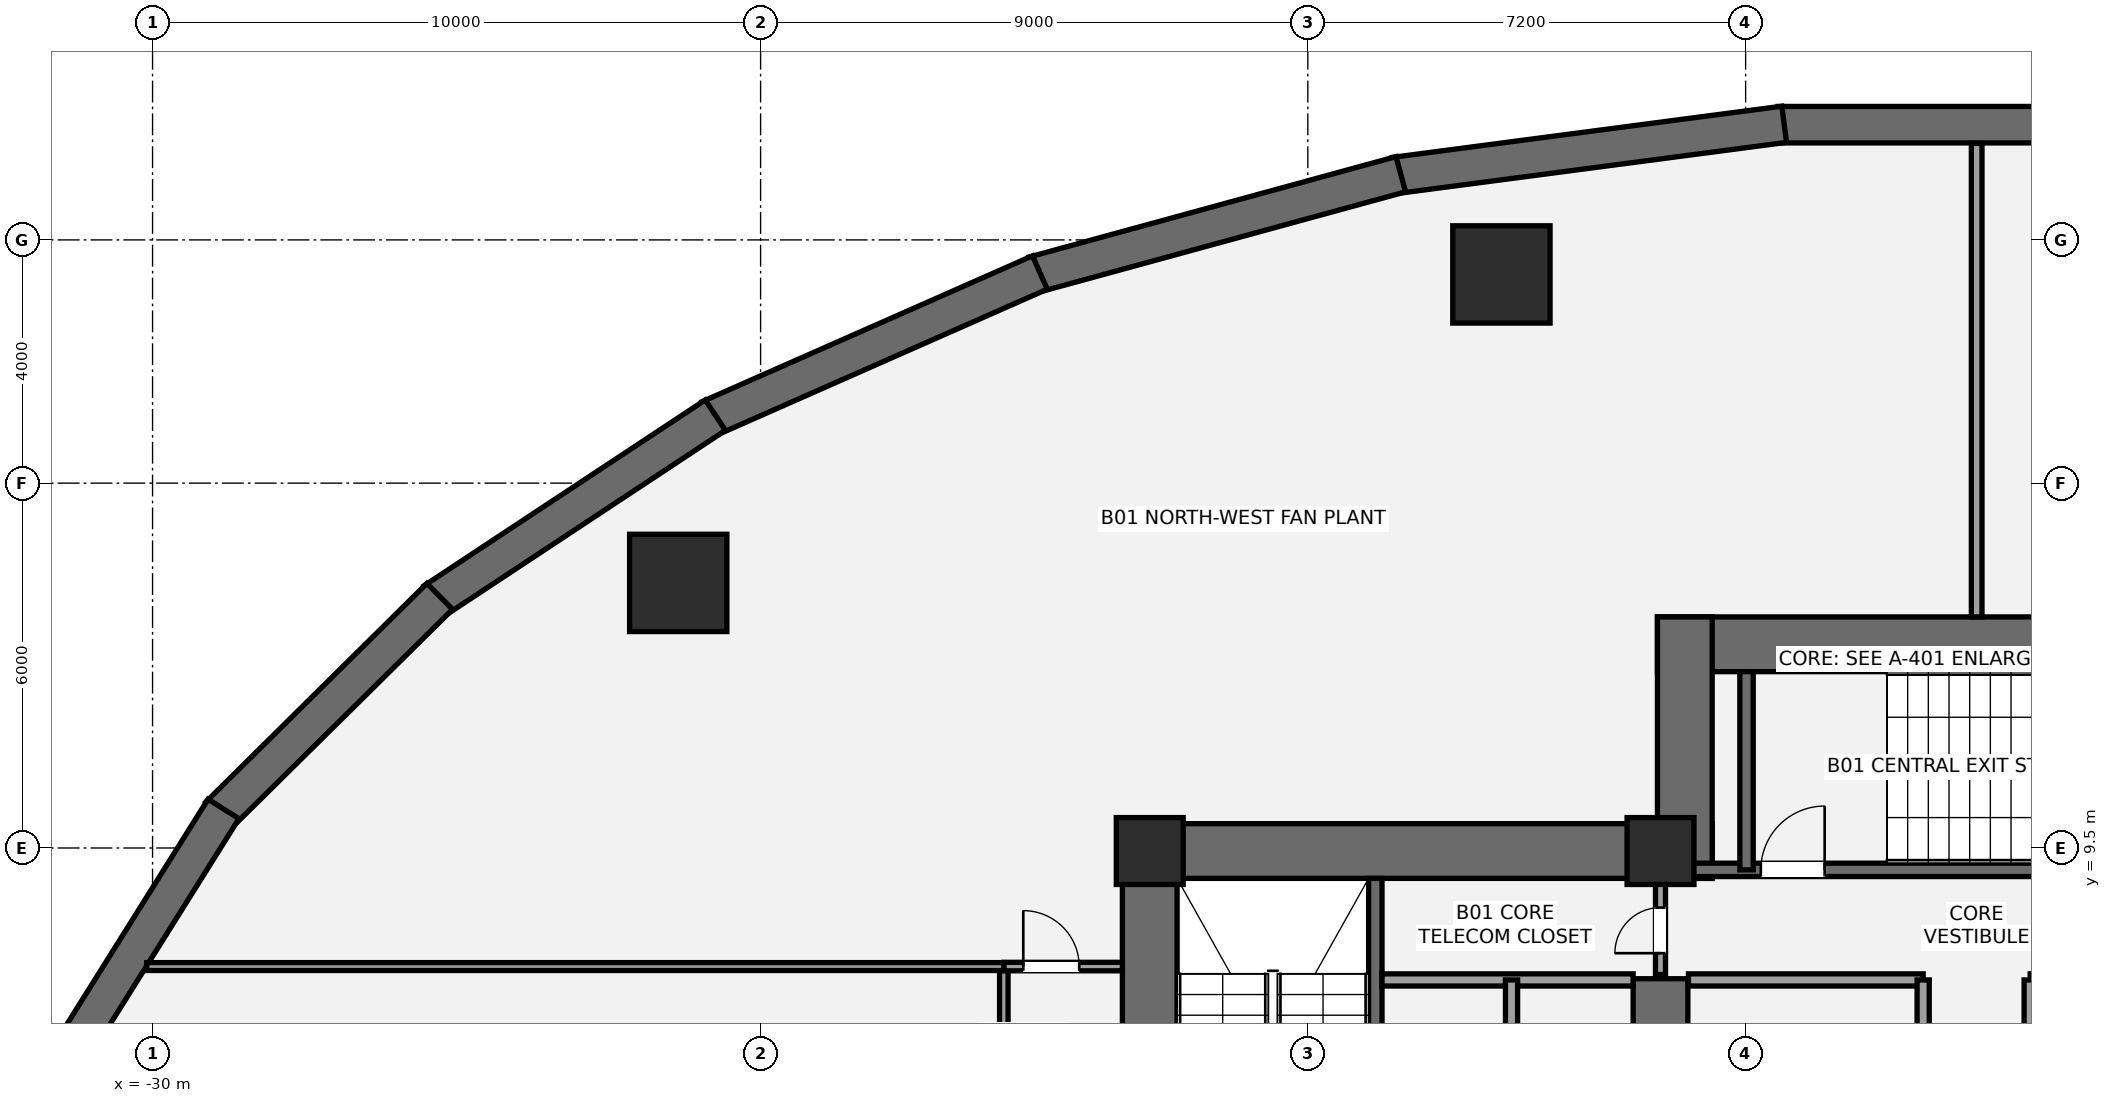
"""IFC4 building model, lengths in metres.
Left out: names, types, materials, properties, quantities, classifications, styles, units other than length and angle.
Written with IfcOpenShell. Run it as: python <this file> out.ifc"""

import sys

from ifc_helpers import new_model, si_unit, direction, frame, frame_2d, origin, origin_2d, place, context, subcontext, project, spatial, rectangle, hollow_circle, extrude, element, fill, save


model = new_model("IFC4")
c1 = context("Model", 3, precision=1e-05, world=origin(), true_north=direction((0.0, 1.0)))
c2 = subcontext(c1, "Body", "Model", "MODEL_VIEW")
j1 = project(units=[si_unit("LENGTHUNIT", "METRE"), si_unit("PLANEANGLEUNIT", "RADIAN")], contexts=[c1])
p1 = place(None, origin())
s1 = spatial("IfcSite", under=j1, at=p1, CompositionType="ELEMENT")
p2 = place(p1, origin())
s2 = spatial("IfcBuilding", under=s1, at=p2, CompositionType="ELEMENT")
p3 = place(p2, frame((0.0, 0.0, -4.4)))
s3 = spatial("IfcBuildingStorey", under=s2, at=p3, CompositionType="ELEMENT", Elevation=-4.4)
p4 = place(p3, frame((3.265, 21.395, 0.0), z_axis=(0.0, 0.0, 1.0), x_axis=(-1.0, 0.0, 0.0)))
e1 = element("IfcWall", 1, at=p4, inside=s3, PredefinedType="USERDEFINED", context=c2, shape_type="SweptSolid", body=[
    extrude(rectangle(XDim=6.529, YDim=0.6, at=frame_2d((3.265, 0.0))), origin(), (0.0, 0.0, 1.0), 4.4),
])
p5 = place(p3, frame((-3.166, 21.402, 0.0), z_axis=(0.0, 0.0, 1.0), x_axis=(-0.991471782517, -0.130321542624, 0.0)))
e2 = element("IfcWall", 2, at=p5, inside=s3, PredefinedType="USERDEFINED", context=c2, shape_type="SweptSolid", body=[
    extrude(rectangle(XDim=6.459, YDim=0.6, at=frame_2d((3.23, 0.0))), origin(), (0.0, 0.0, 1.0), 4.4),
])
p6 = place(p3, frame((-9.471, 20.58, 0.0), z_axis=(0.0, 0.0, 1.0), x_axis=(-0.964548276597, -0.263906464707, 0.0)))
e3 = element("IfcWall", 3, at=p6, inside=s3, PredefinedType="USERDEFINED", context=c2, shape_type="SweptSolid", body=[
    extrude(rectangle(XDim=6.257, YDim=0.6, at=frame_2d((3.128, 0.0))), origin(), (0.0, 0.0, 1.0), 4.4),
])
p7 = place(p3, frame((-15.407, 18.964, 0.0), z_axis=(0.0, 0.0, 1.0), x_axis=(-0.91483072277, -0.403837527574, 0.0)))
e4 = element("IfcWall", 4, at=p7, inside=s3, PredefinedType="USERDEFINED", context=c2, shape_type="SweptSolid", body=[
    extrude(rectangle(XDim=5.94, YDim=0.6, at=frame_2d((2.97, 0.0))), origin(), (0.0, 0.0, 1.0), 4.4),
])
p8 = place(p3, frame((-20.745, 16.618, 0.0), z_axis=(0.0, 0.0, 1.0), x_axis=(-0.834367518908, -0.551208529861, 0.0)))
e5 = element("IfcWall", 5, at=p8, inside=s3, PredefinedType="USERDEFINED", context=c2, shape_type="SweptSolid", body=[
    extrude(rectangle(XDim=5.542, YDim=0.6, at=frame_2d((2.771, 0.0))), origin(), (0.0, 0.0, 1.0), 4.4),
])
p9 = place(p3, frame((-25.277, 13.638, 0.0), z_axis=(0.0, 0.0, 1.0), x_axis=(-0.711105403666, -0.70308541791, 0.0)))
e6 = element("IfcWall", 6, at=p9, inside=s3, PredefinedType="USERDEFINED", context=c2, shape_type="SweptSolid", body=[
    extrude(rectangle(XDim=5.114, YDim=0.6, at=frame_2d((2.557, 0.0))), origin(), (0.0, 0.0, 1.0), 4.4),
])
p10 = place(p3, frame((-28.833, 10.142, 0.0), z_axis=(0.0, 0.0, 1.0), x_axis=(-0.531244363113, -0.847218641592, 0.0)))
e7 = element("IfcWall", 7, at=p10, inside=s3, PredefinedType="USERDEFINED", context=c2, shape_type="SweptSolid", body=[
    extrude(rectangle(XDim=4.72, YDim=0.6, at=frame_2d((2.36, 0.0))), origin(), (0.0, 0.0, 1.0), 4.4),
])
p11 = place(p3, frame((-13.6, 0.95, 0.0), z_axis=(0.0, 0.0, 1.0), x_axis=(0.0, 1.0, 0.0)))
e8 = element("IfcWall", 8, at=p11, inside=s3, PredefinedType="SHEAR", context=c2, shape_type="SweptSolid", body=[
    extrude(rectangle(XDim=8.95, YDim=0.9, at=frame_2d((4.475, 0.0))), origin(), (0.0, 0.0, 1.0), 4.4),
])
p12 = place(p3, frame((-14.05, 9.45, 0.0), z_axis=(0.0, 0.0, 1.0), x_axis=(1.0, 0.0, 0.0)))
e9 = element("IfcWall", 9, at=p12, inside=s3, PredefinedType="SHEAR", context=c2, shape_type="SweptSolid", body=[
    extrude(rectangle(XDim=9.7, YDim=0.9, at=frame_2d((4.85, 0.0))), origin(), (0.0, 0.0, 1.0), 4.4),
])
p13 = place(p3, frame((-5.2, 5.35, 0.0), z_axis=(0.0, 0.0, 1.0), x_axis=(0.0, 1.0, 0.0)))
e10 = element("IfcWall", 10, at=p13, inside=s3, PredefinedType="SHEAR", context=c2, shape_type="SweptSolid", body=[
    extrude(rectangle(XDim=2.0, YDim=0.9, at=frame_2d((1.0, 0.0))), origin(), (0.0, 0.0, 1.0), 4.4),
])
p14 = place(p3, frame((-9.89, 1.85, 0.0), z_axis=(0.0, 0.0, 1.0), x_axis=(0.0, 1.0, 0.0)))
e11 = element("IfcWall", 11, at=p14, inside=s3, PredefinedType="SHEAR", context=c2, shape_type="SweptSolid", body=[
    extrude(rectangle(XDim=7.15, YDim=0.22, at=frame_2d((3.575, 0.0))), origin(), (0.0, 0.0, 1.0), 4.4),
])
p15 = place(p3, frame((-5.25, 12.85, 0.0), z_axis=(0.0, 0.0, 1.0), x_axis=(1.0, 0.0, 0.0)))
e12 = element("IfcWall", 12, at=p15, inside=s3, PredefinedType="SHEAR", context=c2, shape_type="SweptSolid", body=[
    extrude(rectangle(XDim=10.5, YDim=0.9, at=frame_2d((5.25, 0.0))), origin(), (0.0, 0.0, 1.0), 4.4),
])
p16 = place(p3, frame((-4.8, 9.0, 0.0), z_axis=(0.0, 0.0, 1.0), x_axis=(0.0, 1.0, 0.0)))
e13 = element("IfcWall", 13, at=p16, inside=s3, PredefinedType="SHEAR", context=c2, shape_type="SweptSolid", body=[
    extrude(rectangle(XDim=4.3, YDim=0.9, at=frame_2d((2.15, 0.0))), origin(), (0.0, 0.0, 1.0), 4.4),
])
p17 = place(p3, frame((-4.7, 9.14, 0.0), z_axis=(0.0, 0.0, 1.0), x_axis=(1.0, 0.0, 0.0)))
e14 = element("IfcWall", 14, at=p17, inside=s3, PredefinedType="SHEAR", context=c2, shape_type="SweptSolid", body=[
    extrude(rectangle(XDim=9.3, YDim=0.22, at=frame_2d((4.65, 0.0))), origin(), (0.0, 0.0, 1.0), 4.4),
])
p18 = place(p17, frame((1.15, 0.0, 0.0)))
e15 = element("IfcOpeningElement", 15, at=p18, cuts=e14, PredefinedType="OPENING", context=c2, shape_type="SweptSolid", body=[
    extrude(rectangle(XDim=1.05, YDim=2.15, at=frame_2d((0.525, 1.075))), frame((0.0, 0.12, 0.0), z_axis=(0.0, -1.0, 0.0), x_axis=(1.0, 0.0, 0.0)), (0.0, 0.0, 1.0), 0.24),
])
p19 = place(p3, frame((-3.785, 9.14, 0.0), z_axis=(0.0, 0.0, 1.0), x_axis=(0.0, 1.0, 0.0)))
e16 = element("IfcWall", 16, at=p19, inside=s3, PredefinedType="SHEAR", context=c2, shape_type="SweptSolid", body=[
    extrude(rectangle(XDim=3.26, YDim=0.22, at=frame_2d((1.63, 0.0))), origin(), (0.0, 0.0, 1.0), 4.4),
])
for number, where, z_axis, x_axis in (
    (17, (-13.6, 9.45, 0.0), (0.0, 0.0, 1.0), (1.0, 0.0, 0.0)),
    (18, (-5.2, 9.45, 0.0), (0.0, 0.0, 1.0), (1.0, 0.0, 0.0)),
):
    element("IfcColumn", number, at=place(p3, frame(where, z_axis=z_axis, x_axis=x_axis)), inside=s3, PredefinedType="COLUMN", context=c2, shape_type="SweptSolid", body=[
        extrude(rectangle(XDim=1.1, YDim=1.1, at=origin_2d()), origin(), (0.0, 0.0, 1.0), 4.4),
    ])
for number, where, z_axis, x_axis in (
    (19, (-7.816, 18.932, 0.0), (0.0, 0.0, 1.0), (1.0, 0.0, 0.0)),
    (20, (-21.354, 13.859, 0.0), (0.0, 0.0, 1.0), (1.0, 0.0, 0.0)),
):
    element("IfcColumn", number, at=place(p3, frame(where, z_axis=z_axis, x_axis=x_axis)), inside=s3, PredefinedType="USERDEFINED", context=c2, shape_type="SweptSolid", body=[
        extrude(hollow_circle(Radius=0.8, WallThickness=0.06, at=origin_2d()), origin(), (0.0, 0.0, 1.0), 4.4),
    ])
p20 = place(p3, frame((-9.78, 7.33, 0.0), z_axis=(0.0, 0.0, 1.0), x_axis=(1.0, 0.0, 0.0)))
e21 = element("IfcWall", 21, at=p20, inside=s3, PredefinedType="SOLIDWALL", context=c2, shape_type="SweptSolid", body=[
    extrude(rectangle(XDim=4.13, YDim=0.2, at=frame_2d((2.065, 0.0))), origin(), (0.0, 0.0, 1.0), 4.14),
])
p21 = place(p3, frame((-7.65, 5.47, 0.0), z_axis=(0.0, 0.0, 1.0), x_axis=(0.0, 1.0, 0.0)))
e22 = element("IfcWall", 22, at=p21, inside=s3, PredefinedType="SOLIDWALL", context=c2, shape_type="SweptSolid", body=[
    extrude(rectangle(XDim=1.86, YDim=0.2, at=frame_2d((0.93, 0.0))), origin(), (0.0, 0.0, 1.0), 4.14),
])
for number, where, z_axis, x_axis in (
    (23, (-4.74, 7.33, 0.0), (0.0, 0.0, 1.0), (1.0, 0.0, 0.0)),
    (24, (0.88, 7.33, 0.0), (0.0, 0.0, 1.0), (1.0, 0.0, 0.0)),
):
    element("IfcWall", number, at=place(p3, frame(where, z_axis=z_axis, x_axis=x_axis)), inside=s3, PredefinedType="SOLIDWALL", context=c2, shape_type="SweptSolid", body=[
        extrude(rectangle(XDim=3.86, YDim=0.2, at=frame_2d((1.93, 0.0))), origin(), (0.0, 0.0, 1.0), 4.14),
    ])
for number, where, z_axis, x_axis in (
    (25, (-0.88, 5.52, 0.0), (0.0, 0.0, 1.0), (0.0, 1.0, 0.0)),
    (26, (0.88, 5.52, 0.0), (0.0, 0.0, 1.0), (0.0, 1.0, 0.0)),
):
    element("IfcWall", number, at=place(p3, frame(where, z_axis=z_axis, x_axis=x_axis)), inside=s3, PredefinedType="SOLIDWALL", context=c2, shape_type="SweptSolid", body=[
        extrude(rectangle(XDim=1.81, YDim=0.2, at=frame_2d((0.905, 0.0))), origin(), (0.0, 0.0, 1.0), 4.14),
    ])
p22 = place(p3, frame((-5.2, 7.42, 0.0), z_axis=(0.0, 0.0, 1.0), x_axis=(0.0, 1.0, 0.0)))
e27 = element("IfcWall", 27, at=p22, inside=s3, PredefinedType="PARTITIONING", context=c2, shape_type="SweptSolid", body=[
    extrude(rectangle(XDim=1.58, YDim=0.165, at=frame_2d((0.79, 0.0))), origin(), (0.0, 0.0, 1.0), 4.14),
])
p23 = place(p22, frame((0.35, 0.0, 0.0)))
e28 = element("IfcOpeningElement", 28, at=p23, cuts=e27, PredefinedType="OPENING", context=c2, shape_type="SweptSolid", body=[
    extrude(rectangle(XDim=0.75, YDim=2.1, at=frame_2d((0.375, 1.05))), frame((0.0, 0.093, 0.0), z_axis=(0.0, -1.0, 0.0), x_axis=(1.0, 0.0, 0.0)), (0.0, 0.0, 1.0), 0.185),
])
p24 = place(p3, frame((-16.0, -18.365, 0.0), z_axis=(0.0, 0.0, 1.0), x_axis=(0.0, 1.0, 0.0)))
e29 = element("IfcWall", 29, at=p24, inside=s3, PredefinedType="PARTITIONING", context=c2, shape_type="SweptSolid", body=[
    extrude(rectangle(XDim=25.916, YDim=0.14, at=frame_2d((12.958, 0.0))), origin(), (0.0, 0.0, 1.0), 3.508),
])
p25 = place(p24, frame((15.766, 0.0, 0.0)))
e30 = element("IfcOpeningElement", 30, at=p25, cuts=e29, PredefinedType="OPENING", context=c2, shape_type="SweptSolid", body=[
    extrude(rectangle(XDim=0.9, YDim=2.1, at=frame_2d((0.45, 1.05))), frame((0.0, 0.08, 0.0), z_axis=(0.0, -1.0, 0.0), x_axis=(1.0, 0.0, 0.0)), (0.0, 0.0, 1.0), 0.16),
])
p26 = place(p24, frame((22.441, 0.0, 0.0)))
e31 = element("IfcOpeningElement", 31, at=p26, cuts=e29, PredefinedType="OPENING", context=c2, shape_type="SweptSolid", body=[
    extrude(rectangle(XDim=0.9, YDim=2.1, at=frame_2d((0.45, 1.05))), frame((0.0, 0.08, 0.0), z_axis=(0.0, -1.0, 0.0), x_axis=(1.0, 0.0, 0.0)), (0.0, 0.0, 1.0), 0.16),
])
p27 = place(p3, frame((-16.0, 7.55, 0.0), z_axis=(0.0, 0.0, 1.0), x_axis=(1.0, 0.0, 0.0)))
e32 = element("IfcWall", 32, at=p27, inside=s3, PredefinedType="PARTITIONING", context=c2, shape_type="SweptSolid", body=[
    extrude(rectangle(XDim=1.95, YDim=0.14, at=frame_2d((0.975, 0.0))), origin(), (0.0, 0.0, 1.0), 4.14),
])
p28 = place(p27, frame((0.32, 0.0, 0.0)))
e33 = element("IfcOpeningElement", 33, at=p28, cuts=e32, PredefinedType="OPENING", context=c2, shape_type="SweptSolid", body=[
    extrude(rectangle(XDim=0.92, YDim=2.15, at=frame_2d((0.46, 1.075))), frame((0.0, 0.08, 0.0), z_axis=(0.0, -1.0, 0.0), x_axis=(1.0, 0.0, 0.0)), (0.0, 0.0, 1.0), 0.16),
])
p29 = place(p3, frame((0.0, 13.3, 0.0), z_axis=(0.0, 0.0, 1.0), x_axis=(0.0, 1.0, 0.0)))
e34 = element("IfcWall", 34, at=p29, inside=s3, PredefinedType="PARTITIONING", context=c2, shape_type="SweptSolid", body=[
    extrude(rectangle(XDim=7.787, YDim=0.175, at=frame_2d((3.894, 0.0))), origin(), (0.0, 0.0, 1.0), 4.14),
])
p30 = place(p3, frame((-30.095, 7.55, 0.0), z_axis=(0.0, 0.0, 1.0), x_axis=(1.0, 0.0, 0.0)))
e35 = element("IfcWall", 35, at=p30, inside=s3, PredefinedType="PARTITIONING", context=c2, shape_type="SweptSolid", body=[
    extrude(rectangle(XDim=14.095, YDim=0.13, at=frame_2d((7.048, 0.0))), origin(), (0.0, 0.0, 1.0), 3.118),
])
p31 = place(p18, origin())
e36 = element("IfcDoor", 36, at=p31, inside=s3, OperationType="SINGLE_SWING_RIGHT", PredefinedType="DOOR", context=c2, shape_type="SweptSolid", body=[
    extrude(rectangle(XDim=1.05, YDim=2.15, at=frame_2d((0.525, 1.075))), frame((0.0, 0.025, 0.0), z_axis=(0.0, -1.0, 0.0), x_axis=(1.0, 0.0, 0.0)), (0.0, 0.0, 1.0), 0.05),
])
fill(e15, e36)
p32 = place(p23, origin())
e37 = element("IfcDoor", 37, at=p32, inside=s3, OperationType="SINGLE_SWING_LEFT", PredefinedType="DOOR", context=c2, shape_type="SweptSolid", body=[
    extrude(rectangle(XDim=0.75, YDim=2.1, at=frame_2d((0.375, 1.05))), frame((0.0, 0.025, 0.0), z_axis=(0.0, -1.0, 0.0), x_axis=(1.0, 0.0, 0.0)), (0.0, 0.0, 1.0), 0.05),
])
fill(e28, e37)
p33 = place(p28, origin())
e38 = element("IfcDoor", 38, at=p33, inside=s3, OperationType="SINGLE_SWING_LEFT", PredefinedType="DOOR", context=c2, shape_type="SweptSolid", body=[
    extrude(rectangle(XDim=0.92, YDim=2.15, at=frame_2d((0.46, 1.075))), frame((0.0, 0.025, 0.0), z_axis=(0.0, -1.0, 0.0), x_axis=(1.0, 0.0, 0.0)), (0.0, 0.0, 1.0), 0.05),
])
fill(e33, e38)
save(model, sys.argv[1])
